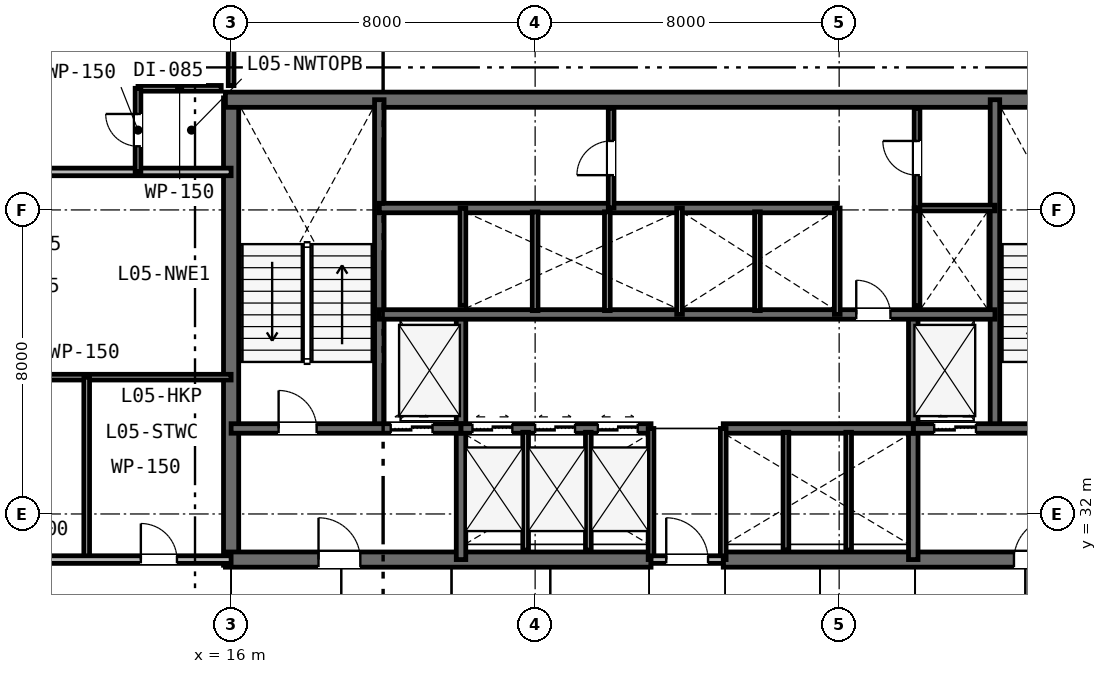
"""IFC4 building model, lengths in metres.
Left out: names, types, materials, properties, quantities, classifications, styles, units other than length and angle.
Written with IfcOpenShell. Run it as: python <this file> out.ifc"""

import sys

from ifc_helpers import new_model, si_unit, direction, frame, frame_2d, origin, place, context, subcontext, project, spatial, rectangle, extrude, element, fill, save


model = new_model("IFC4")
c1 = context("Model", 3, precision=1e-05, world=origin(), true_north=direction((0.0, 1.0)))
c2 = subcontext(c1, "Body", "Model", "MODEL_VIEW")
j1 = project(units=[si_unit("LENGTHUNIT", "METRE"), si_unit("PLANEANGLEUNIT", "RADIAN")], contexts=[c1])
p1 = place(None, origin())
s1 = spatial("IfcSite", under=j1, at=p1, CompositionType="ELEMENT")
p2 = place(p1, origin())
s2 = spatial("IfcBuilding", under=s1, at=p2, CompositionType="ELEMENT")
p3 = place(p2, frame((0.0, 0.0, 25.8)))
s3 = spatial("IfcBuildingStorey", under=s2, at=p3, CompositionType="ELEMENT", Elevation=25.8)
p4 = place(p3, frame((16.0, 30.65, 0.0), z_axis=(0.0, 0.0, 1.0), x_axis=(0.0, 1.0, 0.0)))
e1 = element("IfcWall", 1, at=p4, inside=s3, PredefinedType="SHEAR", context=c2, shape_type="SweptSolid", body=[
    extrude(rectangle(XDim=12.3, YDim=0.4, at=frame_2d((6.15, 0.0))), origin(), (0.0, 0.0, 1.0), 3.6),
])
p5 = place(p3, frame((15.85, 42.9, 0.0), z_axis=(0.0, 0.0, 1.0), x_axis=(1.0, 0.0, 0.0)))
e2 = element("IfcWall", 2, at=p5, inside=s3, PredefinedType="SHEAR", context=c2, shape_type="SweptSolid", body=[
    extrude(rectangle(XDim=24.3, YDim=0.4, at=frame_2d((12.15, 0.0))), origin(), (0.0, 0.0, 1.0), 3.6),
])
p6 = place(p3, frame((15.85, 30.8, 0.0), z_axis=(0.0, 0.0, 1.0), x_axis=(1.0, 0.0, 0.0)))
e3 = element("IfcWall", 3, at=p6, inside=s3, PredefinedType="SHEAR", context=c2, shape_type="SweptSolid", body=[
    extrude(rectangle(XDim=11.2, YDim=0.4, at=frame_2d((5.6, 0.0))), origin(), (0.0, 0.0, 1.0), 3.6),
])
p7 = place(p6, frame((2.45, 0.0, 0.0)))
e4 = element("IfcOpeningElement", 4, at=p7, cuts=e3, PredefinedType="OPENING", context=c2, shape_type="SweptSolid", body=[
    extrude(rectangle(XDim=1.1, YDim=2.15, at=frame_2d((0.55, 1.075))), frame((0.0, 0.21, 0.0), z_axis=(0.0, -1.0, 0.0), x_axis=(1.0, 0.0, 0.0)), (0.0, 0.0, 1.0), 0.42),
])
p8 = place(p3, frame((28.95, 30.8, 0.0), z_axis=(0.0, 0.0, 1.0), x_axis=(1.0, 0.0, 0.0)))
e5 = element("IfcWall", 5, at=p8, inside=s3, PredefinedType="SHEAR", context=c2, shape_type="SweptSolid", body=[
    extrude(rectangle(XDim=11.2, YDim=0.4, at=frame_2d((5.6, 0.0))), origin(), (0.0, 0.0, 1.0), 3.6),
])
p9 = place(p8, frame((7.65, 0.0, 0.0)))
e6 = element("IfcOpeningElement", 6, at=p9, cuts=e5, PredefinedType="OPENING", context=c2, shape_type="SweptSolid", body=[
    extrude(rectangle(XDim=1.1, YDim=2.15, at=frame_2d((0.55, 1.075))), frame((0.0, 0.21, 0.0), z_axis=(0.0, -1.0, 0.0), x_axis=(1.0, 0.0, 0.0)), (0.0, 0.0, 1.0), 0.42),
])
for number, where, z_axis, x_axis in (
    (7, (19.9, 34.25, 0.0), (0.0, 0.0, 1.0), (0.0, 1.0, 0.0)),
    (8, (36.1, 34.25, 0.0), (0.0, 0.0, 1.0), (0.0, 1.0, 0.0)),
):
    element("IfcWall", number, at=place(p3, frame(where, z_axis=z_axis, x_axis=x_axis)), inside=s3, PredefinedType="SHEAR", context=c2, shape_type="SweptSolid", body=[
        extrude(rectangle(XDim=8.65, YDim=0.25, at=frame_2d((4.325, 0.0))), origin(), (0.0, 0.0, 1.0), 3.6),
    ])
for number, where, z_axis, x_axis in (
    (9, (22.05, 30.8, 0.0), (0.0, 0.0, 1.0), (0.0, 1.0, 0.0)),
    (10, (33.95, 30.8, 0.0), (0.0, 0.0, 1.0), (0.0, 1.0, 0.0)),
):
    element("IfcWall", number, at=place(p3, frame(where, z_axis=z_axis, x_axis=x_axis)), inside=s3, PredefinedType="SHEAR", context=c2, shape_type="SweptSolid", body=[
        extrude(rectangle(XDim=6.45, YDim=0.25, at=frame_2d((3.225, 0.0))), origin(), (0.0, 0.0, 1.0), 3.6),
    ])
p10 = place(p3, frame((16.0, 34.25, 0.0), z_axis=(0.0, 0.0, 1.0), x_axis=(1.0, 0.0, 0.0)))
e11 = element("IfcWall", 11, at=p10, inside=s3, PredefinedType="SHEAR", context=c2, shape_type="SweptSolid", body=[
    extrude(rectangle(XDim=6.05, YDim=0.25, at=frame_2d((3.025, 0.0))), origin(), (0.0, 0.0, 1.0), 3.6),
])
p11 = place(p10, frame((1.25, 0.0, 0.0)))
e12 = element("IfcOpeningElement", 12, at=p11, cuts=e11, PredefinedType="OPENING", context=c2, shape_type="SweptSolid", body=[
    extrude(rectangle(XDim=1.0, YDim=2.15, at=frame_2d((0.5, 1.075))), frame((0.0, 0.135, 0.0), z_axis=(0.0, -1.0, 0.0), x_axis=(1.0, 0.0, 0.0)), (0.0, 0.0, 1.0), 0.27),
])
p12 = place(p10, frame((4.2, 0.0, 0.0)))
e13 = element("IfcOpeningElement", 13, at=p12, cuts=e11, PredefinedType="OPENING", context=c2, shape_type="SweptSolid", body=[
    extrude(rectangle(XDim=1.1, YDim=2.15, at=frame_2d((0.55, 1.075))), frame((0.0, 0.135, 0.0), z_axis=(0.0, -1.0, 0.0), x_axis=(1.0, 0.0, 0.0)), (0.0, 0.0, 1.0), 0.27),
])
p13 = place(p3, frame((33.95, 34.25, 0.0), z_axis=(0.0, 0.0, 1.0), x_axis=(1.0, 0.0, 0.0)))
e14 = element("IfcWall", 14, at=p13, inside=s3, PredefinedType="SHEAR", context=c2, shape_type="SweptSolid", body=[
    extrude(rectangle(XDim=6.05, YDim=0.25, at=frame_2d((3.025, 0.0))), origin(), (0.0, 0.0, 1.0), 3.6),
])
p14 = place(p13, frame((3.7, 0.0, 0.0)))
e15 = element("IfcOpeningElement", 15, at=p14, cuts=e14, PredefinedType="OPENING", context=c2, shape_type="SweptSolid", body=[
    extrude(rectangle(XDim=1.0, YDim=2.15, at=frame_2d((0.5, 1.075))), frame((0.0, 0.135, 0.0), z_axis=(0.0, -1.0, 0.0), x_axis=(1.0, 0.0, 0.0)), (0.0, 0.0, 1.0), 0.27),
])
p15 = place(p13, frame((0.55, 0.0, 0.0)))
e16 = element("IfcOpeningElement", 16, at=p15, cuts=e14, PredefinedType="OPENING", context=c2, shape_type="SweptSolid", body=[
    extrude(rectangle(XDim=1.1, YDim=2.15, at=frame_2d((0.55, 1.075))), frame((0.0, 0.135, 0.0), z_axis=(0.0, -1.0, 0.0), x_axis=(1.0, 0.0, 0.0)), (0.0, 0.0, 1.0), 0.27),
])
p16 = place(p3, frame((22.05, 34.25, 0.0), z_axis=(0.0, 0.0, 1.0), x_axis=(1.0, 0.0, 0.0)))
e17 = element("IfcWall", 17, at=p16, inside=s3, PredefinedType="SHEAR", context=c2, shape_type="SweptSolid", body=[
    extrude(rectangle(XDim=5.0, YDim=0.25, at=frame_2d((2.5, 0.0))), origin(), (0.0, 0.0, 1.0), 3.6),
])
p17 = place(p16, frame((0.3, 0.0, 0.0)))
e18 = element("IfcOpeningElement", 18, at=p17, cuts=e17, PredefinedType="OPENING", context=c2, shape_type="SweptSolid", body=[
    extrude(rectangle(XDim=1.05, YDim=2.15, at=frame_2d((0.525, 1.075))), frame((0.0, 0.135, 0.0), z_axis=(0.0, -1.0, 0.0), x_axis=(1.0, 0.0, 0.0)), (0.0, 0.0, 1.0), 0.27),
])
p18 = place(p16, frame((1.95, 0.0, 0.0)))
e19 = element("IfcOpeningElement", 19, at=p18, cuts=e17, PredefinedType="OPENING", context=c2, shape_type="SweptSolid", body=[
    extrude(rectangle(XDim=1.05, YDim=2.15, at=frame_2d((0.525, 1.075))), frame((0.0, 0.135, 0.0), z_axis=(0.0, -1.0, 0.0), x_axis=(1.0, 0.0, 0.0)), (0.0, 0.0, 1.0), 0.27),
])
p19 = place(p16, frame((3.6, 0.0, 0.0)))
e20 = element("IfcOpeningElement", 20, at=p19, cuts=e17, PredefinedType="OPENING", context=c2, shape_type="SweptSolid", body=[
    extrude(rectangle(XDim=1.05, YDim=2.15, at=frame_2d((0.525, 1.075))), frame((0.0, 0.135, 0.0), z_axis=(0.0, -1.0, 0.0), x_axis=(1.0, 0.0, 0.0)), (0.0, 0.0, 1.0), 0.27),
])
p20 = place(p3, frame((28.95, 34.25, 0.0), z_axis=(0.0, 0.0, 1.0), x_axis=(1.0, 0.0, 0.0)))
e21 = element("IfcWall", 21, at=p20, inside=s3, PredefinedType="SHEAR", context=c2, shape_type="SweptSolid", body=[
    extrude(rectangle(XDim=5.0, YDim=0.25, at=frame_2d((2.5, 0.0))), origin(), (0.0, 0.0, 1.0), 3.6),
])
p21 = place(p3, frame((19.9, 37.25, 0.0), z_axis=(0.0, 0.0, 1.0), x_axis=(1.0, 0.0, 0.0)))
e22 = element("IfcWall", 22, at=p21, inside=s3, PredefinedType="SHEAR", context=c2, shape_type="SweptSolid", body=[
    extrude(rectangle(XDim=16.2, YDim=0.25, at=frame_2d((8.1, 0.0))), origin(), (0.0, 0.0, 1.0), 3.6),
])
p22 = place(p21, frame((12.55, 0.0, 0.0)))
e23 = element("IfcOpeningElement", 23, at=p22, cuts=e22, PredefinedType="OPENING", context=c2, shape_type="SweptSolid", body=[
    extrude(rectangle(XDim=0.9, YDim=2.15, at=frame_2d((0.45, 1.075))), frame((0.0, 0.135, 0.0), z_axis=(0.0, -1.0, 0.0), x_axis=(1.0, 0.0, 0.0)), (0.0, 0.0, 1.0), 0.27),
])
p23 = place(p3, frame((19.9, 40.05, 0.0), z_axis=(0.0, 0.0, 1.0), x_axis=(1.0, 0.0, 0.0)))
e24 = element("IfcWall", 24, at=p23, inside=s3, PredefinedType="SHEAR", context=c2, shape_type="SweptSolid", body=[
    extrude(rectangle(XDim=12.05, YDim=0.25, at=frame_2d((6.025, 0.0))), origin(), (0.0, 0.0, 1.0), 3.6),
])
for number, where, z_axis, x_axis in (
    (25, (27.05, 30.8, 0.0), (0.0, 0.0, 1.0), (0.0, 1.0, 0.0)),
    (26, (28.95, 30.8, 0.0), (0.0, 0.0, 1.0), (0.0, 1.0, 0.0)),
):
    element("IfcWall", number, at=place(p3, frame(where, z_axis=z_axis, x_axis=x_axis)), inside=s3, PredefinedType="PLUMBINGWALL", context=c2, shape_type="SweptSolid", body=[
        extrude(rectangle(XDim=3.45, YDim=0.15, at=frame_2d((1.725, 0.0))), origin(), (0.0, 0.0, 1.0), 3.33),
    ])
p24 = place(p3, frame((27.05, 30.8, 0.0), z_axis=(0.0, 0.0, 1.0), x_axis=(1.0, 0.0, 0.0)))
e27 = element("IfcWall", 27, at=p24, inside=s3, PredefinedType="PARTITIONING", context=c2, shape_type="SweptSolid", body=[
    extrude(rectangle(XDim=1.9, YDim=0.2, at=frame_2d((0.95, 0.0))), origin(), (0.0, 0.0, 1.0), 3.33),
])
p25 = place(p24, frame((0.4, 0.0, 0.0)))
e28 = element("IfcOpeningElement", 28, at=p25, cuts=e27, PredefinedType="OPENING", context=c2, shape_type="SweptSolid", body=[
    extrude(rectangle(XDim=1.1, YDim=2.15, at=frame_2d((0.55, 1.075))), frame((0.0, 0.11, 0.0), z_axis=(0.0, -1.0, 0.0), x_axis=(1.0, 0.0, 0.0)), (0.0, 0.0, 1.0), 0.22),
])
for number, where, z_axis, x_axis in (
    (29, (23.75, 31.05, 0.0), (0.0, 0.0, 1.0), (0.0, 1.0, 0.0)),
    (30, (25.4, 31.05, 0.0), (0.0, 0.0, 1.0), (0.0, 1.0, 0.0)),
    (31, (30.6, 31.05, 0.0), (0.0, 0.0, 1.0), (0.0, 1.0, 0.0)),
    (32, (32.25, 31.05, 0.0), (0.0, 0.0, 1.0), (0.0, 1.0, 0.0)),
):
    element("IfcWall", number, at=place(p3, frame(where, z_axis=z_axis, x_axis=x_axis)), inside=s3, PredefinedType="PLUMBINGWALL", context=c2, shape_type="SweptSolid", body=[
        extrude(rectangle(XDim=3.1, YDim=0.15, at=frame_2d((1.55, 0.0))), origin(), (0.0, 0.0, 1.0), 3.33),
    ])
p26 = place(p3, frame((22.1, 37.49, 0.0), z_axis=(0.0, 0.0, 1.0), x_axis=(0.0, 1.0, 0.0)))
e33 = element("IfcWall", 33, at=p26, inside=s3, PredefinedType="PLUMBINGWALL", context=c2, shape_type="SweptSolid", body=[
    extrude(rectangle(XDim=2.56, YDim=0.15, at=frame_2d((1.28, 0.0))), origin(), (0.0, 0.0, 1.0), 3.33),
])
p27 = place(p3, frame((27.8, 37.25, 0.0), z_axis=(0.0, 0.0, 1.0), x_axis=(0.0, 1.0, 0.0)))
e34 = element("IfcWall", 34, at=p27, inside=s3, PredefinedType="PLUMBINGWALL", context=c2, shape_type="SweptSolid", body=[
    extrude(rectangle(XDim=2.8, YDim=0.15, at=frame_2d((1.4, 0.0))), origin(), (0.0, 0.0, 1.0), 3.33),
])
for number, where, z_axis, x_axis in (
    (35, (24.0, 37.35, 0.0), (0.0, 0.0, 1.0), (0.0, 1.0, 0.0)),
    (36, (25.9, 37.35, 0.0), (0.0, 0.0, 1.0), (0.0, 1.0, 0.0)),
):
    element("IfcWall", number, at=place(p3, frame(where, z_axis=z_axis, x_axis=x_axis)), inside=s3, PredefinedType="PLUMBINGWALL", context=c2, shape_type="SweptSolid", body=[
        extrude(rectangle(XDim=2.6, YDim=0.15, at=frame_2d((1.3, 0.0))), origin(), (0.0, 0.0, 1.0), 3.33),
    ])
p28 = place(p3, frame((31.95, 37.25, 0.0), z_axis=(0.0, 0.0, 1.0), x_axis=(0.0, 1.0, 0.0)))
e37 = element("IfcWall", 37, at=p28, inside=s3, PredefinedType="PLUMBINGWALL", context=c2, shape_type="SweptSolid", body=[
    extrude(rectangle(XDim=2.8, YDim=0.15, at=frame_2d((1.4, 0.0))), origin(), (0.0, 0.0, 1.0), 3.33),
])
p29 = place(p3, frame((29.85, 37.35, 0.0), z_axis=(0.0, 0.0, 1.0), x_axis=(0.0, 1.0, 0.0)))
e38 = element("IfcWall", 38, at=p29, inside=s3, PredefinedType="PLUMBINGWALL", context=c2, shape_type="SweptSolid", body=[
    extrude(rectangle(XDim=2.6, YDim=0.15, at=frame_2d((1.3, 0.0))), origin(), (0.0, 0.0, 1.0), 3.33),
])
p30 = place(p3, frame((34.05, 37.473, 0.0), z_axis=(0.0, 0.0, 1.0), x_axis=(0.0, 1.0, 0.0)))
e39 = element("IfcWall", 39, at=p30, inside=s3, PredefinedType="PLUMBINGWALL", context=c2, shape_type="SweptSolid", body=[
    extrude(rectangle(XDim=2.577, YDim=0.15, at=frame_2d((1.288, 0.0))), origin(), (0.0, 0.0, 1.0), 3.33),
])
p31 = place(p3, frame((34.05, 40.05, 0.0), z_axis=(0.0, 0.0, 1.0), x_axis=(1.0, 0.0, 0.0)))
e40 = element("IfcWall", 40, at=p31, inside=s3, PredefinedType="PARTITIONING", context=c2, shape_type="SweptSolid", body=[
    extrude(rectangle(XDim=2.05, YDim=0.15, at=frame_2d((1.025, 0.0))), origin(), (0.0, 0.0, 1.0), 3.33),
])
p32 = place(p3, frame((34.05, 40.05, 0.0), z_axis=(0.0, 0.0, 1.0), x_axis=(0.0, 1.0, 0.0)))
e41 = element("IfcWall", 41, at=p32, inside=s3, PredefinedType="PARTITIONING", context=c2, shape_type="SweptSolid", body=[
    extrude(rectangle(XDim=2.63, YDim=0.15, at=frame_2d((1.315, 0.0))), origin(), (0.0, 0.0, 1.0), 3.33),
])
p33 = place(p32, frame((0.865, 0.0, 0.0)))
e42 = element("IfcOpeningElement", 42, at=p33, cuts=e41, PredefinedType="OPENING", context=c2, shape_type="SweptSolid", body=[
    extrude(rectangle(XDim=0.9, YDim=2.15, at=frame_2d((0.45, 1.075))), frame((0.0, 0.085, 0.0), z_axis=(0.0, -1.0, 0.0), x_axis=(1.0, 0.0, 0.0)), (0.0, 0.0, 1.0), 0.17),
])
p34 = place(p3, frame((26.0, 40.05, 0.0), z_axis=(0.0, 0.0, 1.0), x_axis=(0.0, 1.0, 0.0)))
e43 = element("IfcWall", 43, at=p34, inside=s3, PredefinedType="PARTITIONING", context=c2, shape_type="SweptSolid", body=[
    extrude(rectangle(XDim=2.63, YDim=0.15, at=frame_2d((1.315, 0.0))), origin(), (0.0, 0.0, 1.0), 3.33),
])
p35 = place(p34, frame((0.865, 0.0, 0.0)))
e44 = element("IfcOpeningElement", 44, at=p35, cuts=e43, PredefinedType="OPENING", context=c2, shape_type="SweptSolid", body=[
    extrude(rectangle(XDim=0.9, YDim=2.15, at=frame_2d((0.45, 1.075))), frame((0.0, 0.085, 0.0), z_axis=(0.0, -1.0, 0.0), x_axis=(1.0, 0.0, 0.0)), (0.0, 0.0, 1.0), 0.17),
])
p36 = place(p3, frame((8.3, 35.6, 0.0), z_axis=(0.0, 0.0, 1.0), x_axis=(1.0, 0.0, 0.0)))
e45 = element("IfcWall", 45, at=p36, inside=s3, PredefinedType="PARTITIONING", context=c2, shape_type="SweptSolid", body=[
    extrude(rectangle(XDim=7.7, YDim=0.15, at=frame_2d((3.85, 0.0))), origin(), (0.0, 0.0, 1.0), 2.68),
])
p37 = place(p3, frame((12.2, 30.8, 0.0), z_axis=(0.0, 0.0, 1.0), x_axis=(0.0, 1.0, 0.0)))
e46 = element("IfcWall", 46, at=p37, inside=s3, PredefinedType="PARTITIONING", context=c2, shape_type="SweptSolid", body=[
    extrude(rectangle(XDim=4.8, YDim=0.15, at=frame_2d((2.4, 0.0))), origin(), (0.0, 0.0, 1.0), 2.68),
])
p38 = place(p3, frame((8.3, 30.8, 0.0), z_axis=(0.0, 0.0, 1.0), x_axis=(1.0, 0.0, 0.0)))
e47 = element("IfcWall", 47, at=p38, inside=s3, PredefinedType="PARTITIONING", context=c2, shape_type="SweptSolid", body=[
    extrude(rectangle(XDim=7.7, YDim=0.2, at=frame_2d((3.85, 0.0))), origin(), (0.0, 0.0, 1.0), 2.68),
])
p39 = place(p38, frame((5.325, 0.0, 0.0)))
e48 = element("IfcOpeningElement", 48, at=p39, cuts=e47, PredefinedType="OPENING", context=c2, shape_type="SweptSolid", body=[
    extrude(rectangle(XDim=0.95, YDim=2.15, at=frame_2d((0.475, 1.075))), frame((0.0, 0.11, 0.0), z_axis=(0.0, -1.0, 0.0), x_axis=(1.0, 0.0, 0.0)), (0.0, 0.0, 1.0), 0.22),
])
p40 = place(p3, frame((0.1, 41.0, 0.0), z_axis=(0.0, 0.0, 1.0), x_axis=(1.0, 0.0, 0.0)))
e49 = element("IfcWall", 49, at=p40, inside=s3, PredefinedType="PARTITIONING", context=c2, shape_type="SweptSolid", body=[
    extrude(rectangle(XDim=15.9, YDim=0.2, at=frame_2d((7.95, 0.0))), origin(), (0.0, 0.0, 1.0), 2.68),
])
p41 = place(p40, frame((6.779, 0.0, 0.0)))
e50 = element("IfcOpeningElement", 50, at=p41, cuts=e49, PredefinedType="OPENING", context=c2, shape_type="SweptSolid", body=[
    extrude(rectangle(XDim=0.95, YDim=2.15, at=frame_2d((0.475, 1.075))), frame((0.0, 0.11, 0.0), z_axis=(0.0, -1.0, 0.0), x_axis=(1.0, 0.0, 0.0)), (0.0, 0.0, 1.0), 0.22),
])
p42 = place(p3, frame((13.55, 43.2, 0.0), z_axis=(0.0, 0.0, 1.0), x_axis=(1.0, 0.0, 0.0)))
e51 = element("IfcWall", 51, at=p42, inside=s3, PredefinedType="PARTITIONING", context=c2, shape_type="SweptSolid", body=[
    extrude(rectangle(XDim=2.19, YDim=0.15, at=frame_2d((1.095, 0.0))), origin(), (0.0, 0.0, 1.0), 3.33),
])
p43 = place(p3, frame((13.55, 41.0, 0.0), z_axis=(0.0, 0.0, 1.0), x_axis=(0.0, 1.0, 0.0)))
e52 = element("IfcWall", 52, at=p43, inside=s3, PredefinedType="PARTITIONING", context=c2, shape_type="SweptSolid", body=[
    extrude(rectangle(XDim=2.2, YDim=0.15, at=frame_2d((1.1, 0.0))), origin(), (0.0, 0.0, 1.0), 3.33),
])
p44 = place(p43, frame((0.675, 0.0, 0.0)))
e53 = element("IfcOpeningElement", 53, at=p44, cuts=e52, PredefinedType="OPENING", context=c2, shape_type="SweptSolid", body=[
    extrude(rectangle(XDim=0.85, YDim=2.15, at=frame_2d((0.425, 1.075))), frame((0.0, 0.085, 0.0), z_axis=(0.0, -1.0, 0.0), x_axis=(1.0, 0.0, 0.0)), (0.0, 0.0, 1.0), 0.17),
])
p45 = place(p3, frame((16.0, 43.27, 0.0), z_axis=(0.0, 0.0, 1.0), x_axis=(0.0, 1.0, 0.0)))
e54 = element("IfcWall", 54, at=p45, inside=s3, PredefinedType="PARTITIONING", context=c2, shape_type="SweptSolid", body=[
    extrude(rectangle(XDim=4.63, YDim=0.15, at=frame_2d((2.315, 0.0))), origin(), (0.0, 0.0, 1.0), 2.87),
])
p46 = place(p25, origin())
e55 = element("IfcDoor", 55, at=p46, inside=s3, OperationType="SINGLE_SWING_LEFT", PredefinedType="DOOR", context=c2, shape_type="SweptSolid", body=[
    extrude(rectangle(XDim=1.1, YDim=2.15, at=frame_2d((0.55, 1.075))), frame((0.0, 0.025, 0.0), z_axis=(0.0, -1.0, 0.0), x_axis=(1.0, 0.0, 0.0)), (0.0, 0.0, 1.0), 0.05),
])
fill(e28, e55)
p47 = place(p11, origin())
e56 = element("IfcDoor", 56, at=p47, inside=s3, OperationType="SINGLE_SWING_LEFT", PredefinedType="DOOR", context=c2, shape_type="SweptSolid", body=[
    extrude(rectangle(XDim=1.0, YDim=2.15, at=frame_2d((0.5, 1.075))), frame((0.0, 0.025, 0.0), z_axis=(0.0, -1.0, 0.0), x_axis=(1.0, 0.0, 0.0)), (0.0, 0.0, 1.0), 0.05),
])
fill(e12, e56)
p48 = place(p7, origin())
e57 = element("IfcDoor", 57, at=p48, inside=s3, OperationType="SINGLE_SWING_LEFT", PredefinedType="DOOR", context=c2, shape_type="SweptSolid", body=[
    extrude(rectangle(XDim=1.1, YDim=2.15, at=frame_2d((0.55, 1.075))), frame((0.0, 0.025, 0.0), z_axis=(0.0, -1.0, 0.0), x_axis=(1.0, 0.0, 0.0)), (0.0, 0.0, 1.0), 0.05),
])
fill(e4, e57)
p49 = place(p9, origin())
e58 = element("IfcDoor", 58, at=p49, inside=s3, OperationType="SINGLE_SWING_RIGHT", PredefinedType="DOOR", context=c2, shape_type="SweptSolid", body=[
    extrude(rectangle(XDim=1.1, YDim=2.15, at=frame_2d((0.55, 1.075))), frame((0.0, 0.025, 0.0), z_axis=(0.0, -1.0, 0.0), x_axis=(1.0, 0.0, 0.0)), (0.0, 0.0, 1.0), 0.05),
])
fill(e6, e58)
p50 = place(p22, origin())
e59 = element("IfcDoor", 59, at=p50, inside=s3, OperationType="SINGLE_SWING_LEFT", PredefinedType="DOOR", context=c2, shape_type="SweptSolid", body=[
    extrude(rectangle(XDim=0.9, YDim=2.15, at=frame_2d((0.45, 1.075))), frame((0.0, 0.025, 0.0), z_axis=(0.0, -1.0, 0.0), x_axis=(1.0, 0.0, 0.0)), (0.0, 0.0, 1.0), 0.05),
])
fill(e23, e59)
p51 = place(p33, origin())
e60 = element("IfcDoor", 60, at=p51, inside=s3, OperationType="SINGLE_SWING_RIGHT", PredefinedType="DOOR", context=c2, shape_type="SweptSolid", body=[
    extrude(rectangle(XDim=0.9, YDim=2.15, at=frame_2d((0.45, 1.075))), frame((0.0, 0.025, 0.0), z_axis=(0.0, -1.0, 0.0), x_axis=(1.0, 0.0, 0.0)), (0.0, 0.0, 1.0), 0.05),
])
fill(e42, e60)
p52 = place(p35, origin())
e61 = element("IfcDoor", 61, at=p52, inside=s3, OperationType="SINGLE_SWING_LEFT", PredefinedType="DOOR", context=c2, shape_type="SweptSolid", body=[
    extrude(rectangle(XDim=0.9, YDim=2.15, at=frame_2d((0.45, 1.075))), frame((0.0, 0.025, 0.0), z_axis=(0.0, -1.0, 0.0), x_axis=(1.0, 0.0, 0.0)), (0.0, 0.0, 1.0), 0.05),
])
fill(e44, e61)
p53 = place(p39, origin())
e62 = element("IfcDoor", 62, at=p53, inside=s3, OperationType="SINGLE_SWING_LEFT", PredefinedType="DOOR", context=c2, shape_type="SweptSolid", body=[
    extrude(rectangle(XDim=0.95, YDim=2.15, at=frame_2d((0.475, 1.075))), frame((0.0, 0.025, 0.0), z_axis=(0.0, -1.0, 0.0), x_axis=(1.0, 0.0, 0.0)), (0.0, 0.0, 1.0), 0.05),
])
fill(e48, e62)
p54 = place(p44, origin())
e63 = element("IfcDoor", 63, at=p54, inside=s3, OperationType="SINGLE_SWING_RIGHT", PredefinedType="DOOR", context=c2, shape_type="SweptSolid", body=[
    extrude(rectangle(XDim=0.85, YDim=2.15, at=frame_2d((0.425, 1.075))), frame((0.0, 0.025, 0.0), z_axis=(0.0, -1.0, 0.0), x_axis=(1.0, 0.0, 0.0)), (0.0, 0.0, 1.0), 0.05),
])
fill(e53, e63)
p55 = place(p12, origin())
e64 = element("IfcDoor", 64, at=p55, inside=s3, OperationType="DOUBLE_DOOR_SLIDING", PredefinedType="DOOR", context=c2, shape_type="SweptSolid", body=[
    extrude(rectangle(XDim=1.1, YDim=2.15, at=frame_2d((0.55, 1.075))), frame((0.0, 0.025, 0.0), z_axis=(0.0, -1.0, 0.0), x_axis=(1.0, 0.0, 0.0)), (0.0, 0.0, 1.0), 0.05),
])
fill(e13, e64)
p56 = place(p15, origin())
e65 = element("IfcDoor", 65, at=p56, inside=s3, OperationType="DOUBLE_DOOR_SLIDING", PredefinedType="DOOR", context=c2, shape_type="SweptSolid", body=[
    extrude(rectangle(XDim=1.1, YDim=2.15, at=frame_2d((0.55, 1.075))), frame((0.0, 0.025, 0.0), z_axis=(0.0, -1.0, 0.0), x_axis=(1.0, 0.0, 0.0)), (0.0, 0.0, 1.0), 0.05),
])
fill(e16, e65)
p57 = place(p17, origin())
e66 = element("IfcDoor", 66, at=p57, inside=s3, OperationType="DOUBLE_DOOR_SLIDING", PredefinedType="DOOR", context=c2, shape_type="SweptSolid", body=[
    extrude(rectangle(XDim=1.05, YDim=2.15, at=frame_2d((0.525, 1.075))), frame((0.0, 0.025, 0.0), z_axis=(0.0, -1.0, 0.0), x_axis=(1.0, 0.0, 0.0)), (0.0, 0.0, 1.0), 0.05),
])
fill(e18, e66)
p58 = place(p18, origin())
e67 = element("IfcDoor", 67, at=p58, inside=s3, OperationType="DOUBLE_DOOR_SLIDING", PredefinedType="DOOR", context=c2, shape_type="SweptSolid", body=[
    extrude(rectangle(XDim=1.05, YDim=2.15, at=frame_2d((0.525, 1.075))), frame((0.0, 0.025, 0.0), z_axis=(0.0, -1.0, 0.0), x_axis=(1.0, 0.0, 0.0)), (0.0, 0.0, 1.0), 0.05),
])
fill(e19, e67)
p59 = place(p19, origin())
e68 = element("IfcDoor", 68, at=p59, inside=s3, OperationType="DOUBLE_DOOR_SLIDING", PredefinedType="DOOR", context=c2, shape_type="SweptSolid", body=[
    extrude(rectangle(XDim=1.05, YDim=2.15, at=frame_2d((0.525, 1.075))), frame((0.0, 0.025, 0.0), z_axis=(0.0, -1.0, 0.0), x_axis=(1.0, 0.0, 0.0)), (0.0, 0.0, 1.0), 0.05),
])
fill(e20, e68)
save(model, sys.argv[1])
